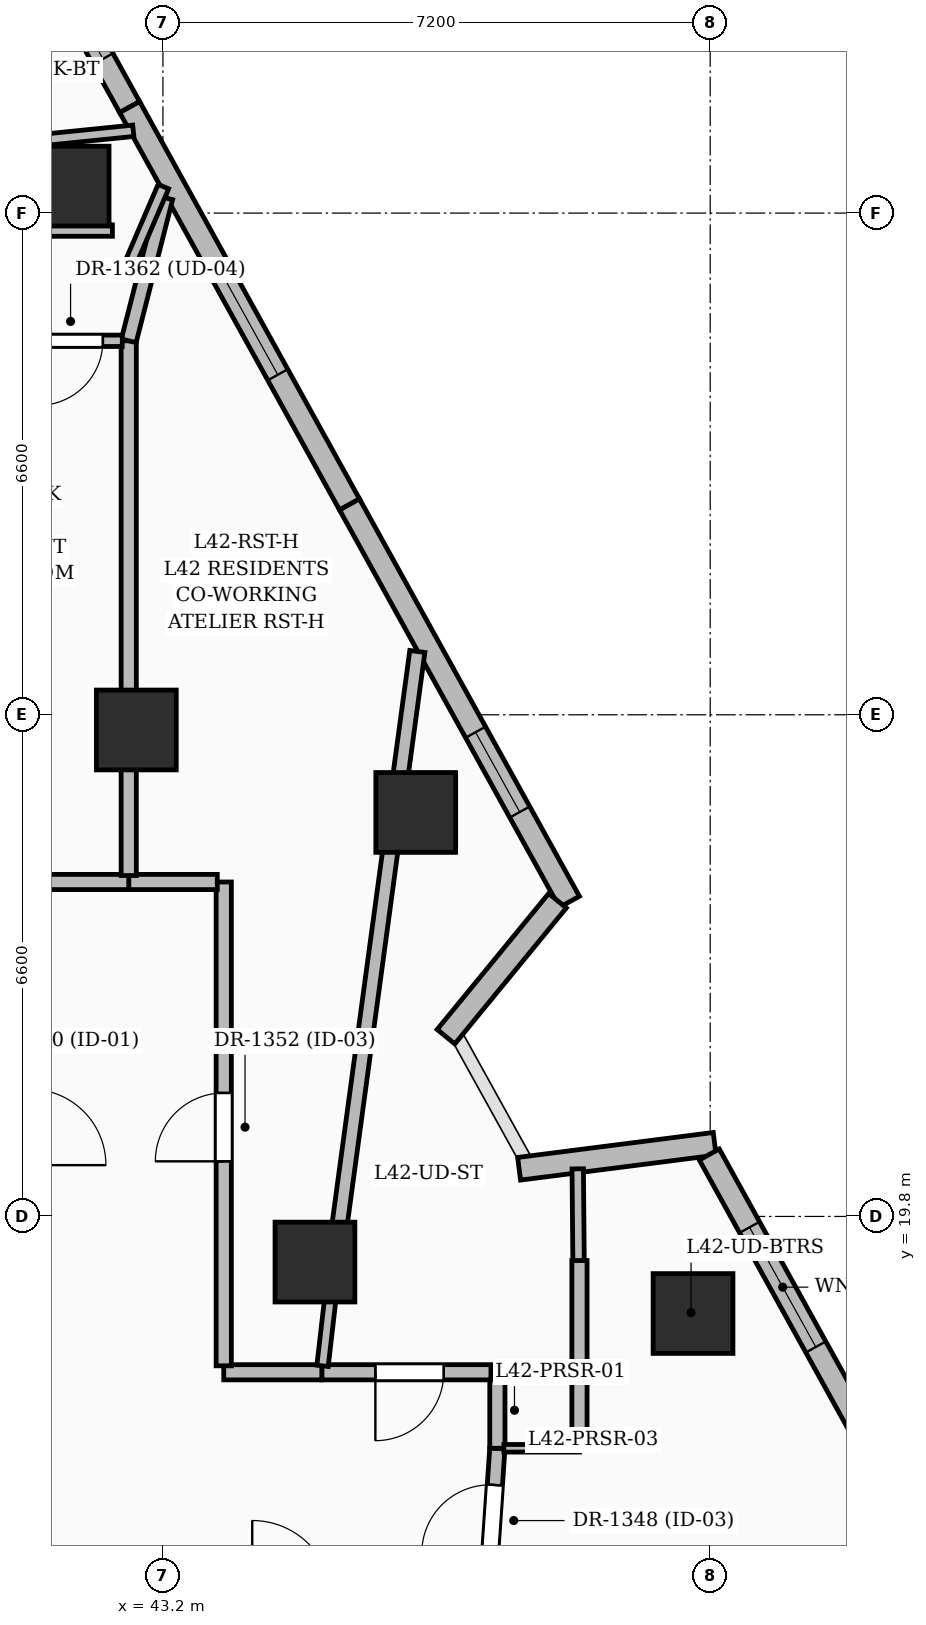
"""IFC4 building model, lengths in metres.
Left out: names, types, materials, properties, quantities, classifications, styles, units other than length and angle.
Written with IfcOpenShell. Run it as: python <this file> out.ifc"""

import sys

from ifc_helpers import new_model, si_unit, direction, frame, frame_2d, origin, origin_2d, place, context, subcontext, project, spatial, rectangle, extrude, element, fill, save


model = new_model("IFC4")
c1 = context("Model", 3, precision=1e-05, world=origin(), true_north=direction((0.0, 1.0)))
c2 = subcontext(c1, "Body", "Model", "MODEL_VIEW")
j1 = project(units=[si_unit("LENGTHUNIT", "METRE"), si_unit("PLANEANGLEUNIT", "RADIAN")], contexts=[c1])
p1 = place(None, origin())
s1 = spatial("IfcSite", under=j1, at=p1, CompositionType="ELEMENT")
p2 = place(p1, origin())
s2 = spatial("IfcBuilding", under=s1, at=p2, CompositionType="ELEMENT")
p3 = place(p2, frame((0.0, 0.0, 164.4)))
s3 = spatial("IfcBuildingStorey", under=s2, at=p3, CompositionType="ELEMENT", Elevation=164.4)
for number, where, z_axis, x_axis in (
    (1, (45.2, 19.2, 0.0), (0.0, 0.0, 1.0), (1.0, 0.0, 0.0)),
    (2, (42.85, 26.2, 0.0), (0.0, 0.0, 1.0), (1.0, 0.0, 0.0)),
    (3, (50.174, 18.523, 0.0), (0.0, 0.0, 1.0), (1.0, 0.0, 0.0)),
    (4, (46.526, 25.115, 0.0), (0.0, 0.0, 1.0), (1.0, 0.0, 0.0)),
    (5, (41.966, 33.355, 0.0), (0.0, 0.0, 1.0), (1.0, 0.0, 0.0)),
):
    element("IfcColumn", number, at=place(p3, frame(where, z_axis=z_axis, x_axis=x_axis)), inside=s3, PredefinedType="COLUMN", context=c2, shape_type="SweptSolid", body=[
        extrude(rectangle(XDim=1.05, YDim=1.05, at=origin_2d()), origin(), (0.0, 0.0, 1.0), 3.6),
    ])
p4 = place(p3, frame((40.15, 39.115, 0.0), z_axis=(0.0, 0.0, 1.0), x_axis=(0.484220621964, -0.874945935052, 0.0)))
e6 = element("IfcWall", 6, at=p4, inside=s3, PredefinedType="SOLIDWALL", context=c2, shape_type="SweptSolid", body=[
    extrude(rectangle(XDim=5.395, YDim=0.3, at=frame_2d((2.697, 0.0))), origin(), (0.0, 0.0, 1.0), 3.35),
])
p5 = place(p4, frame((3.47, 0.0, 0.8)))
e7 = element("IfcOpeningElement", 7, at=p5, cuts=e6, PredefinedType="OPENING", context=c2, shape_type="SweptSolid", body=[
    extrude(rectangle(XDim=1.2, YDim=1.8, at=frame_2d((0.6, 0.9))), frame((0.0, 0.16, 0.0), z_axis=(0.0, -1.0, 0.0), x_axis=(1.0, 0.0, 0.0)), (0.0, 0.0, 1.0), 0.32),
])
p6 = place(p3, frame((42.762, 34.395, 0.0), z_axis=(0.0, 0.0, 1.0), x_axis=(0.484157246346, -0.874981005972, 0.0)))
e8 = element("IfcWall", 8, at=p6, inside=s3, PredefinedType="SOLIDWALL", context=c2, shape_type="SweptSolid", body=[
    extrude(rectangle(XDim=5.974, YDim=0.3, at=frame_2d((2.987, 0.0))), origin(), (0.0, 0.0, 1.0), 3.35),
])
p7 = place(p6, frame((2.525, 0.0, 0.6)))
e9 = element("IfcOpeningElement", 9, at=p7, cuts=e8, PredefinedType="OPENING", context=c2, shape_type="SweptSolid", body=[
    extrude(rectangle(XDim=1.5, YDim=2.1, at=frame_2d((0.75, 1.05))), frame((0.0, 0.16, 0.0), z_axis=(0.0, -1.0, 0.0), x_axis=(1.0, 0.0, 0.0)), (0.0, 0.0, 1.0), 0.32),
])
p8 = place(p3, frame((45.655, 29.167, 0.0), z_axis=(0.0, 0.0, 1.0), x_axis=(0.484202501475, -0.874955963215, 0.0)))
e10 = element("IfcWall", 10, at=p8, inside=s3, PredefinedType="SOLIDWALL", context=c2, shape_type="SweptSolid", body=[
    extrude(rectangle(XDim=5.975, YDim=0.3, at=frame_2d((2.987, 0.0))), origin(), (0.0, 0.0, 1.0), 3.35),
])
p9 = place(p8, frame((3.425, 0.0, 0.8)))
e11 = element("IfcOpeningElement", 11, at=p9, cuts=e10, PredefinedType="OPENING", context=c2, shape_type="SweptSolid", body=[
    extrude(rectangle(XDim=1.2, YDim=1.8, at=frame_2d((0.6, 0.9))), frame((0.0, 0.16, 0.0), z_axis=(0.0, -1.0, 0.0), x_axis=(1.0, 0.0, 0.0)), (0.0, 0.0, 1.0), 0.32),
])
p10 = place(p3, frame((48.391, 23.954, 0.0), z_axis=(0.0, 0.0, 1.0), x_axis=(-0.634082112051, -0.773265720937, 0.0)))
e12 = element("IfcWall", 12, at=p10, inside=s3, PredefinedType="SOLIDWALL", context=c2, shape_type="SweptSolid", body=[
    extrude(rectangle(XDim=2.314, YDim=0.3, at=frame_2d((1.157, 0.0))), origin(), (0.0, 0.0, 1.0), 2.575),
])
p11 = place(p3, frame((47.886, 20.427, 0.0), z_axis=(0.0, 0.0, 1.0), x_axis=(0.99195455838, 0.126594447388, 0.0)))
e13 = element("IfcWall", 13, at=p11, inside=s3, PredefinedType="SOLIDWALL", context=c2, shape_type="SweptSolid", body=[
    extrude(rectangle(XDim=2.594, YDim=0.3, at=frame_2d((1.297, 0.0))), origin(), (0.0, 0.0, 1.0), 2.575),
])
p12 = place(p3, frame((50.388, 20.615, 0.0), z_axis=(0.0, 0.0, 1.0), x_axis=(0.484189890205, -0.8749629422, 0.0)))
e14 = element("IfcWall", 14, at=p12, inside=s3, PredefinedType="SOLIDWALL", context=c2, shape_type="SweptSolid", body=[
    extrude(rectangle(XDim=5.695, YDim=0.3, at=frame_2d((2.847, 0.0))), origin(), (0.0, 0.0, 1.0), 3.35),
])
p13 = place(p12, frame((1.095, 0.0, 0.6)))
e15 = element("IfcOpeningElement", 15, at=p13, cuts=e14, PredefinedType="OPENING", context=c2, shape_type="SweptSolid", body=[
    extrude(rectangle(XDim=1.8, YDim=2.1, at=frame_2d((0.9, 1.05))), frame((0.0, 0.16, 0.0), z_axis=(0.0, -1.0, 0.0), x_axis=(1.0, 0.0, 0.0)), (0.0, 0.0, 1.0), 0.32),
])
p14 = place(p3, frame((47.425, 14.2, 0.0), z_axis=(0.0, 0.0, 1.0), x_axis=(0.068484119878, 0.997652206595, 0.0)))
e16 = element("IfcWall", 16, at=p14, inside=s3, PredefinedType="PARTITIONING", context=c2, shape_type="SweptSolid", body=[
    extrude(rectangle(XDim=2.556, YDim=0.2, at=frame_2d((1.278, 0.0))), origin(), (0.0, 0.0, 1.0), 2.393),
])
p15 = place(p14, frame((1.172, 0.0, 0.0)))
e17 = element("IfcOpeningElement", 17, at=p15, cuts=e16, PredefinedType="OPENING", context=c2, shape_type="SweptSolid", body=[
    extrude(rectangle(XDim=0.9, YDim=2.1, at=frame_2d((0.45, 1.05))), frame((0.0, 0.11, 0.0), z_axis=(0.0, -1.0, 0.0), x_axis=(1.0, 0.0, 0.0)), (0.0, 0.0, 1.0), 0.22),
])
p16 = place(p3, frame((47.6, 16.75, 0.0), z_axis=(0.0, 0.0, 1.0), x_axis=(0.0, 1.0, 0.0)))
e18 = element("IfcWall", 18, at=p16, inside=s3, PredefinedType="PARTITIONING", context=c2, shape_type="SweptSolid", body=[
    extrude(rectangle(XDim=1.0, YDim=0.2, at=frame_2d((0.5, 0.0))), origin(), (0.0, 0.0, 1.0), 2.712),
])
p17 = place(p3, frame((47.515, 17.75, 0.0), z_axis=(0.0, 0.0, 1.0), x_axis=(-1.0, 0.0, 0.0)))
e19 = element("IfcWall", 19, at=p17, inside=s3, PredefinedType="PARTITIONING", context=c2, shape_type="SweptSolid", body=[
    extrude(rectangle(XDim=2.225, YDim=0.2, at=frame_2d((1.112, 0.0))), origin(), (0.0, 0.0, 1.0), 2.436),
])
p18 = place(p17, frame((0.62, 0.0, 0.0)))
e20 = element("IfcOpeningElement", 20, at=p18, cuts=e19, PredefinedType="OPENING", context=c2, shape_type="SweptSolid", body=[
    extrude(rectangle(XDim=0.9, YDim=2.1, at=frame_2d((0.45, 1.05))), frame((0.0, 0.11, 0.0), z_axis=(0.0, -1.0, 0.0), x_axis=(1.0, 0.0, 0.0)), (0.0, 0.0, 1.0), 0.22),
])
p19 = place(p3, frame((45.29, 17.75, 0.0), z_axis=(0.0, 0.0, 1.0), x_axis=(-1.0, 0.0, 0.0)))
e21 = element("IfcWall", 21, at=p19, inside=s3, PredefinedType="PARTITIONING", context=c2, shape_type="SweptSolid", body=[
    extrude(rectangle(XDim=1.29, YDim=0.2, at=frame_2d((0.645, 0.0))), origin(), (0.0, 0.0, 1.0), 3.35),
])
p20 = place(p3, frame((44.0, 17.835, 0.0), z_axis=(0.0, 0.0, 1.0), x_axis=(0.0, 1.0, 0.0)))
e22 = element("IfcWall", 22, at=p20, inside=s3, PredefinedType="PARTITIONING", context=c2, shape_type="SweptSolid", body=[
    extrude(rectangle(XDim=6.365, YDim=0.2, at=frame_2d((3.183, 0.0))), origin(), (0.0, 0.0, 1.0), 2.436),
])
p21 = place(p20, frame((2.69, 0.0, 0.0)))
e23 = element("IfcOpeningElement", 23, at=p21, cuts=e22, PredefinedType="OPENING", context=c2, shape_type="SweptSolid", body=[
    extrude(rectangle(XDim=0.9, YDim=2.1, at=frame_2d((0.45, 1.05))), frame((0.0, 0.11, 0.0), z_axis=(0.0, -1.0, 0.0), x_axis=(1.0, 0.0, 0.0)), (0.0, 0.0, 1.0), 0.22),
])
p22 = place(p3, frame((43.915, 24.2, 0.0), z_axis=(0.0, 0.0, 1.0), x_axis=(-1.0, 0.0, 0.0)))
e24 = element("IfcWall", 24, at=p22, inside=s3, PredefinedType="PARTITIONING", context=c2, shape_type="SweptSolid", body=[
    extrude(rectangle(XDim=1.165, YDim=0.2, at=frame_2d((0.583, 0.0))), origin(), (0.0, 0.0, 1.0), 2.436),
])
p23 = place(p3, frame((42.75, 24.2, 0.0), z_axis=(0.0, 0.0, 1.0), x_axis=(-1.0, 0.0, 0.0)))
e25 = element("IfcWall", 25, at=p23, inside=s3, PredefinedType="PARTITIONING", context=c2, shape_type="SweptSolid", body=[
    extrude(rectangle(XDim=1.3, YDim=0.2, at=frame_2d((0.65, 0.0))), origin(), (0.0, 0.0, 1.0), 3.35),
])
p24 = place(p3, frame((48.68, 16.75, 0.0), z_axis=(0.0, 0.0, 1.0), x_axis=(-1.0, 0.0, 0.0)))
e26 = element("IfcWall", 26, at=p24, inside=s3, PredefinedType="PARTITIONING", context=c2, shape_type="SweptSolid", body=[
    extrude(rectangle(XDim=0.995, YDim=0.1, at=frame_2d((0.498, 0.0))), origin(), (0.0, 0.0, 1.0), 2.393),
])
p25 = place(p3, frame((48.68, 16.785, 0.0), z_axis=(0.0, 0.0, 1.0), x_axis=(0.0, 1.0, 0.0)))
e27 = element("IfcWall", 27, at=p25, inside=s3, PredefinedType="PARTITIONING", context=c2, shape_type="SweptSolid", body=[
    extrude(rectangle(XDim=2.435, YDim=0.2, at=frame_2d((1.218, 0.0))), origin(), (0.0, 0.0, 1.0), 2.393),
])
p26 = place(p3, frame((45.46, 19.22, 0.0), z_axis=(0.0, 0.0, 1.0), x_axis=(-0.114830071869, -0.993385149172, 0.0)))
e28 = element("IfcWall", 28, at=p26, inside=s3, PredefinedType="PARTITIONING", context=c2, shape_type="SweptSolid", body=[
    extrude(rectangle(XDim=1.395, YDim=0.15, at=frame_2d((0.697, 0.0))), origin(), (0.0, 0.0, 1.0), 2.436),
])
p27 = place(p3, frame((46.547, 27.233, 0.0), z_axis=(0.0, 0.0, 1.0), x_axis=(-0.134443567653, -0.990921251723, 0.0)))
e29 = element("IfcWall", 29, at=p27, inside=s3, PredefinedType="PARTITIONING", context=c2, shape_type="SweptSolid", body=[
    extrude(rectangle(XDim=8.086, YDim=0.2, at=frame_2d((4.043, 0.0))), origin(), (0.0, 0.0, 1.0), 2.393),
])
p28 = place(p3, frame((42.75, 31.32, 0.0), z_axis=(0.0, 0.0, 1.0), x_axis=(0.0, -1.0, 0.0)))
e30 = element("IfcWall", 30, at=p28, inside=s3, PredefinedType="PARTITIONING", context=c2, shape_type="SweptSolid", body=[
    extrude(rectangle(XDim=7.035, YDim=0.2, at=frame_2d((3.518, 0.0))), origin(), (0.0, 0.0, 1.0), 2.393),
])
p29 = place(p3, frame((43.23, 33.202, 0.0), z_axis=(0.0, 0.0, 1.0), x_axis=(-0.247413379041, -0.968910016396, 0.0)))
e31 = element("IfcWall", 31, at=p29, inside=s3, PredefinedType="PARTITIONING", context=c2, shape_type="SweptSolid", body=[
    extrude(rectangle(XDim=1.942, YDim=0.2, at=frame_2d((0.971, 0.0))), origin(), (0.0, 0.0, 1.0), 2.57),
])
p30 = place(p3, frame((42.665, 31.32, 0.0), z_axis=(0.0, 0.0, 1.0), x_axis=(-1.0, 0.0, 0.0)))
e32 = element("IfcWall", 32, at=p30, inside=s3, PredefinedType="PARTITIONING", context=c2, shape_type="SweptSolid", body=[
    extrude(rectangle(XDim=1.545, YDim=0.15, at=frame_2d((0.772, 0.0))), origin(), (0.0, 0.0, 1.0), 2.393),
])
p31 = place(p30, frame((0.255, 0.0, 0.0)))
e33 = element("IfcOpeningElement", 33, at=p31, cuts=e32, PredefinedType="OPENING", context=c2, shape_type="SweptSolid", body=[
    extrude(rectangle(XDim=0.85, YDim=2.1, at=frame_2d((0.425, 1.05))), frame((0.0, 0.085, 0.0), z_axis=(0.0, -1.0, 0.0), x_axis=(1.0, 0.0, 0.0)), (0.0, 0.0, 1.0), 0.17),
])
p32 = place(p3, frame((48.657, 20.426, 0.0), z_axis=(0.0, 0.0, 1.0), x_axis=(0.009108933821, -0.999958512802, 0.0)))
e34 = element("IfcWall", 34, at=p32, inside=s3, PredefinedType="PARTITIONING", context=c2, shape_type="SweptSolid", body=[
    extrude(rectangle(XDim=1.206, YDim=0.15, at=frame_2d((0.603, 0.0))), origin(), (0.0, 0.0, 1.0), 2.393),
])
p33 = place(p3, frame((42.75, 32.29, 0.0), z_axis=(0.0, 0.0, 1.0), x_axis=(0.3955030033, 0.918464683252, 0.0)))
e35 = element("IfcWall", 35, at=p33, inside=s3, PredefinedType="PARTITIONING", context=c2, shape_type="SweptSolid", body=[
    extrude(rectangle(XDim=1.153, YDim=0.15, at=frame_2d((0.577, 0.0))), origin(), (0.0, 0.0, 1.0), 2.57),
])
p34 = place(p3, frame((42.535, 32.77, 0.0), z_axis=(0.0, 0.0, 1.0), x_axis=(-1.0, 0.0, 0.0)))
e36 = element("IfcWall", 36, at=p34, inside=s3, PredefinedType="PARTITIONING", context=c2, shape_type="SweptSolid", body=[
    extrude(rectangle(XDim=1.155, YDim=0.15, at=frame_2d((0.578, 0.0))), origin(), (0.0, 0.0, 1.0), 2.393),
])
p35 = place(p3, frame((41.398, 33.94, 0.0), z_axis=(0.0, 0.0, 1.0), x_axis=(0.994906914974, 0.10079796891, 0.0)))
e37 = element("IfcWall", 37, at=p35, inside=s3, PredefinedType="PARTITIONING", context=c2, shape_type="SweptSolid", body=[
    extrude(rectangle(XDim=1.419, YDim=0.15, at=frame_2d((0.71, 0.0))), origin(), (0.0, 0.0, 1.0), 3.35),
])
p36 = place(p5, origin())
e38 = element("IfcWindow", 38, at=p36, inside=s3, PartitioningType="SINGLE_PANEL", PredefinedType="WINDOW", context=c2, shape_type="SweptSolid", body=[
    extrude(rectangle(XDim=1.2, YDim=1.8, at=frame_2d((0.6, 0.9))), frame((0.0, 0.03, 0.0), z_axis=(0.0, -1.0, 0.0), x_axis=(1.0, 0.0, 0.0)), (0.0, 0.0, 1.0), 0.06),
])
fill(e7, e38)
p37 = place(p7, origin())
e39 = element("IfcWindow", 39, at=p37, inside=s3, PartitioningType="SINGLE_PANEL", PredefinedType="WINDOW", context=c2, shape_type="SweptSolid", body=[
    extrude(rectangle(XDim=1.5, YDim=2.1, at=frame_2d((0.75, 1.05))), frame((0.0, 0.03, 0.0), z_axis=(0.0, -1.0, 0.0), x_axis=(1.0, 0.0, 0.0)), (0.0, 0.0, 1.0), 0.06),
])
fill(e9, e39)
p38 = place(p9, origin())
e40 = element("IfcWindow", 40, at=p38, inside=s3, PartitioningType="SINGLE_PANEL", PredefinedType="WINDOW", context=c2, shape_type="SweptSolid", body=[
    extrude(rectangle(XDim=1.2, YDim=1.8, at=frame_2d((0.6, 0.9))), frame((0.0, 0.03, 0.0), z_axis=(0.0, -1.0, 0.0), x_axis=(1.0, 0.0, 0.0)), (0.0, 0.0, 1.0), 0.06),
])
fill(e11, e40)
p39 = place(p13, origin())
e41 = element("IfcWindow", 41, at=p39, inside=s3, PartitioningType="SINGLE_PANEL", PredefinedType="WINDOW", context=c2, shape_type="SweptSolid", body=[
    extrude(rectangle(XDim=1.8, YDim=2.1, at=frame_2d((0.9, 1.05))), frame((0.0, 0.03, 0.0), z_axis=(0.0, -1.0, 0.0), x_axis=(1.0, 0.0, 0.0)), (0.0, 0.0, 1.0), 0.06),
])
fill(e15, e41)
p40 = place(p15, origin())
e42 = element("IfcDoor", 42, at=p40, inside=s3, OperationType="SINGLE_SWING_LEFT", PredefinedType="DOOR", context=c2, shape_type="SweptSolid", body=[
    extrude(rectangle(XDim=0.9, YDim=2.1, at=frame_2d((0.45, 1.05))), frame((0.0, 0.025, 0.0), z_axis=(0.0, -1.0, 0.0), x_axis=(1.0, 0.0, 0.0)), (0.0, 0.0, 1.0), 0.05),
])
fill(e17, e42)
p41 = place(p21, origin())
e43 = element("IfcDoor", 43, at=p41, inside=s3, OperationType="SINGLE_SWING_LEFT", PredefinedType="DOOR", context=c2, shape_type="SweptSolid", body=[
    extrude(rectangle(XDim=0.9, YDim=2.1, at=frame_2d((0.45, 1.05))), frame((0.0, 0.025, 0.0), z_axis=(0.0, -1.0, 0.0), x_axis=(1.0, 0.0, 0.0)), (0.0, 0.0, 1.0), 0.05),
])
fill(e23, e43)
p42 = place(p18, origin())
e44 = element("IfcDoor", 44, at=p42, inside=s3, OperationType="SINGLE_SWING_RIGHT", PredefinedType="DOOR", context=c2, shape_type="SweptSolid", body=[
    extrude(rectangle(XDim=0.9, YDim=2.1, at=frame_2d((0.45, 1.05))), frame((0.0, 0.025, 0.0), z_axis=(0.0, -1.0, 0.0), x_axis=(1.0, 0.0, 0.0)), (0.0, 0.0, 1.0), 0.05),
])
fill(e20, e44)
p43 = place(p31, origin())
e45 = element("IfcDoor", 45, at=p43, inside=s3, OperationType="SINGLE_SWING_RIGHT", PredefinedType="DOOR", context=c2, shape_type="SweptSolid", body=[
    extrude(rectangle(XDim=0.85, YDim=2.1, at=frame_2d((0.425, 1.05))), frame((0.0, 0.025, 0.0), z_axis=(0.0, -1.0, 0.0), x_axis=(1.0, 0.0, 0.0)), (0.0, 0.0, 1.0), 0.05),
])
fill(e33, e45)
save(model, sys.argv[1])
